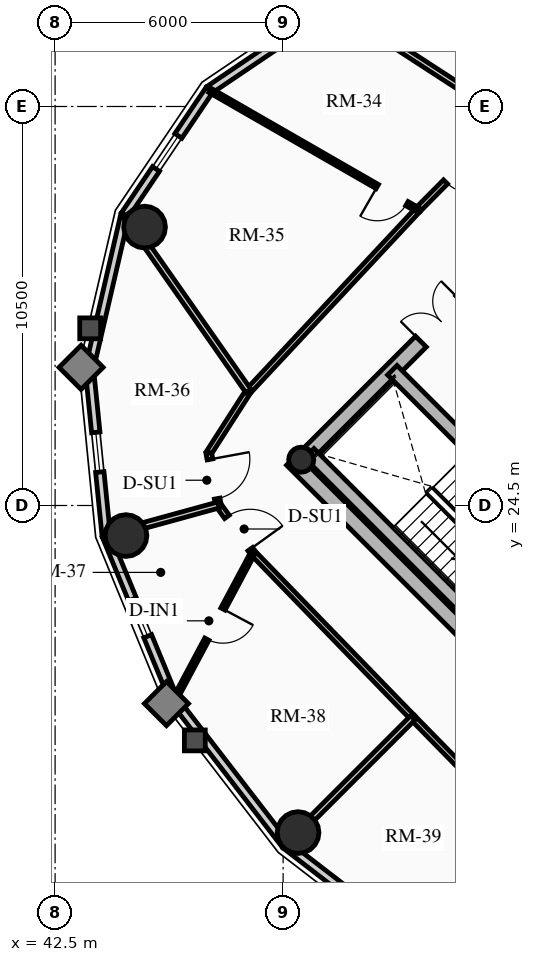
"""IFC4 building model, lengths in metres.
Left out: names, types, materials, properties, quantities, classifications, styles, units other than length and angle.
Written with IfcOpenShell. Run it as: python <this file> out.ifc"""

import sys

from ifc_helpers import new_model, si_unit, direction, frame, frame_2d, origin, origin_2d, place, context, subcontext, project, spatial, rectangle, circle, hollow_circle, extrude, source, transform, mapped, element, fill, save


model = new_model("IFC4")
c1 = context("Model", 3, precision=1e-05, world=origin(), true_north=direction((0.0, 1.0)))
c2 = subcontext(c1, "Body", "Model", "MODEL_VIEW")
j1 = project(units=[si_unit("LENGTHUNIT", "METRE"), si_unit("PLANEANGLEUNIT", "RADIAN")], contexts=[c1])
p1 = place(None, origin())
s1 = spatial("IfcSite", under=j1, at=p1, CompositionType="ELEMENT")
p2 = place(p1, origin())
s2 = spatial("IfcBuilding", under=s1, at=p2, CompositionType="ELEMENT")
p3 = place(p2, frame((0.0, 0.0, 208.3)))
s3 = spatial("IfcBuildingStorey", under=s2, at=p3, CompositionType="ELEMENT", Elevation=208.3)
p4 = place(p3, frame((58.702, 15.732, 0.0), z_axis=(0.0, 0.0, 1.0), x_axis=(-0.707106781187, 0.707106781187, 0.0)))
e1 = element("IfcWall", 1, at=p4, inside=s3, PredefinedType="SHEAR", context=c2, shape_type="SweptSolid", body=[
    extrude(rectangle(XDim=14.1, YDim=0.4, at=frame_2d((7.05, 0.0))), origin(), (0.0, 0.0, 1.0), 2.91),
])
p5 = place(p3, frame((48.873, 25.561, 0.0), z_axis=(0.0, 0.0, 1.0), x_axis=(0.707106781187, 0.707106781187, 0.0)))
e2 = element("IfcWall", 2, at=p5, inside=s3, PredefinedType="SHEAR", context=c2, shape_type="SweptSolid", body=[
    extrude(rectangle(XDim=10.7, YDim=0.4, at=frame_2d((5.35, 0.0))), origin(), (0.0, 0.0, 1.0), 2.91),
])
m1 = source(origin(), c2, "Body", "SweptSolid", [
    extrude(rectangle(XDim=1.5, YDim=2.02, at=frame_2d((0.75, 1.01))), frame((0.0, 0.21, 0.0), z_axis=(0.0, -1.0, 0.0), x_axis=(1.0, 0.0, 0.0)), (0.0, 0.0, 1.0), 0.42),
])
p6 = place(p5, frame((4.6, 0.0, 0.0)))
e3 = element("IfcOpeningElement", 3, at=p6, cuts=e2, PredefinedType="OPENING", context=c2, shape_type="MappedRepresentation", body=[
    mapped(m1, transform((0.0, 0.0, 0.0), x_axis=(1.0, 0.0, 0.0), y_axis=(0.0, 1.0, 0.0), z_axis=(0.0, 0.0, 1.0), scale=1.0)),
])
p7 = place(p3, frame((61.06, 18.373, 0.0), z_axis=(0.0, 0.0, 1.0), x_axis=(-0.707106781187, 0.707106781187, 0.0)))
e4 = element("IfcWall", 4, at=p7, inside=s3, PredefinedType="SHEAR", context=c2, shape_type="SweptSolid", body=[
    extrude(rectangle(XDim=13.7, YDim=0.35, at=frame_2d((6.85, 0.0))), origin(), (0.0, 0.0, 1.0), 2.91),
])
m2 = source(origin(), c2, "Body", "SweptSolid", [
    extrude(rectangle(XDim=1.1, YDim=2.015, at=frame_2d((0.55, 1.007))), frame((0.0, 0.185, 0.0), z_axis=(0.0, -1.0, 0.0), x_axis=(1.0, 0.0, 0.0)), (0.0, 0.0, 1.0), 0.37),
])
p8 = place(p7, frame((4.85, 0.0, 0.0)))
e5 = element("IfcOpeningElement", 5, at=p8, cuts=e4, PredefinedType="OPENING", context=c2, shape_type="MappedRepresentation", body=[
    mapped(m2, transform((0.0, 0.0, 0.0), x_axis=(1.0, 0.0, 0.0), y_axis=(0.0, 1.0, 0.0), z_axis=(0.0, 0.0, 1.0), scale=1.0)),
])
p9 = place(p7, frame((0.625, 0.0, 0.0)))
e6 = element("IfcOpeningElement", 6, at=p9, cuts=e4, PredefinedType="OPENING", context=c2, shape_type="MappedRepresentation", body=[
    mapped(m2, transform((0.0, 0.0, 0.0), x_axis=(1.0, 0.0, 0.0), y_axis=(0.0, 1.0, 0.0), z_axis=(0.0, 0.0, 1.0), scale=1.0)),
])
p10 = place(p7, frame((2.625, 0.0, 0.0)))
e7 = element("IfcOpeningElement", 7, at=p10, cuts=e4, PredefinedType="OPENING", context=c2, shape_type="MappedRepresentation", body=[
    mapped(m2, transform((0.0, 0.0, 0.0), x_axis=(1.0, 0.0, 0.0), y_axis=(0.0, 1.0, 0.0), z_axis=(0.0, 0.0, 1.0), scale=1.0)),
])
m3 = source(origin(), c2, "Body", "SweptSolid", [
    extrude(rectangle(XDim=1.15, YDim=2.02, at=frame_2d((0.575, 1.01))), frame((0.0, 0.185, 0.0), z_axis=(0.0, -1.0, 0.0), x_axis=(1.0, 0.0, 0.0)), (0.0, 0.0, 1.0), 0.37),
])
p11 = place(p7, frame((7.27, 0.0, 0.0)))
e8 = element("IfcOpeningElement", 8, at=p11, cuts=e4, PredefinedType="OPENING", context=c2, shape_type="MappedRepresentation", body=[
    mapped(m3, transform((0.0, 0.0, 0.0), x_axis=(1.0, 0.0, 0.0), y_axis=(0.0, 1.0, 0.0), z_axis=(0.0, 0.0, 1.0), scale=1.0)),
])
p12 = place(p3, frame((53.922, 21.141, 0.0), z_axis=(0.0, 0.0, 1.0), x_axis=(-0.707106781187, 0.707106781187, 0.0)))
e9 = element("IfcWall", 9, at=p12, inside=s3, PredefinedType="SHEAR", context=c2, shape_type="SweptSolid", body=[
    extrude(rectangle(XDim=6.695, YDim=0.35, at=frame_2d((3.348, 0.0))), origin(), (0.0, 0.0, 1.0), 2.91),
])
p13 = place(p3, frame((48.976, 25.706, 0.0), z_axis=(0.0, 0.0, 1.0), x_axis=(0.707106781187, 0.707106781187, 0.0)))
e10 = element("IfcColumn", 10, at=p13, inside=s3, PredefinedType="COLUMN", context=c2, shape_type="SweptSolid", body=[
    extrude(hollow_circle(Radius=0.33, WallThickness=0.025, at=origin_2d()), origin(), (0.0, 0.0, 1.0), 2.91),
])
for number, where, z_axis, x_axis in (
    (11, (44.854, 31.827, 0.0), (0.0, 0.0, 1.0), (1.0, 0.0, 0.0)),
    (12, (44.365, 23.709, 0.0), (0.0, 0.0, 1.0), (1.0, 0.0, 0.0)),
    (13, (48.893, 15.893, 0.0), (0.0, 0.0, 1.0), (1.0, 0.0, 0.0)),
):
    element("IfcColumn", number, at=place(p3, frame(where, z_axis=z_axis, x_axis=x_axis)), inside=s3, PredefinedType="USERDEFINED", context=c2, shape_type="SweptSolid", body=[
        extrude(circle(Radius=0.55, at=origin_2d()), origin(), (0.0, 0.0, 1.0), 2.91),
    ])
p14 = place(p3, frame((46.561, 35.439, 0.0), z_axis=(0.0, 0.0, 1.0), x_axis=(0.828833723692, 0.559495003079, 0.0)))
e14 = element("IfcWall", 14, at=p14, inside=s3, PredefinedType="SOLIDWALL", context=c2, shape_type="SweptSolid", body=[
    extrude(rectangle(XDim=3.976, YDim=0.22, at=frame_2d((1.988, 0.0))), origin(), (0.0, 0.0, 1.0), 2.322),
])
p15 = place(p3, frame((44.337, 32.144, 0.0), z_axis=(0.0, 0.0, 1.0), x_axis=(0.559495003079, 0.828833723692, 0.0)))
e15 = element("IfcWall", 15, at=p15, inside=s3, PredefinedType="SOLIDWALL", context=c2, shape_type="SweptSolid", body=[
    extrude(rectangle(XDim=3.976, YDim=0.22, at=frame_2d((1.988, 0.0))), origin(), (0.0, 0.0, 1.0), 2.322),
])
m4 = source(origin(), c2, "Body", "SweptSolid", [
    extrude(rectangle(XDim=1.05, YDim=1.3, at=frame_2d((0.525, 0.65))), frame((0.0, 0.12, 0.0), z_axis=(0.0, -1.0, 0.0), x_axis=(1.0, 0.0, 0.0)), (0.0, 0.0, 1.0), 0.24),
])
p16 = place(p15, frame((1.463, 0.0, 0.65)))
e16 = element("IfcOpeningElement", 16, at=p16, cuts=e15, PredefinedType="OPENING", context=c2, shape_type="MappedRepresentation", body=[
    mapped(m4, transform((0.0, 0.0, 0.0), x_axis=(1.0, 0.0, 0.0), y_axis=(0.0, 1.0, 0.0), z_axis=(0.0, 0.0, 1.0), scale=1.0)),
])
p17 = place(p3, frame((43.401, 28.1, 0.0), z_axis=(0.0, 0.0, 1.0), x_axis=(0.225473813158, 0.974249228678, 0.0)))
e17 = element("IfcWall", 17, at=p17, inside=s3, PredefinedType="SOLIDWALL", context=c2, shape_type="SweptSolid", body=[
    extrude(rectangle(XDim=4.15, YDim=0.22, at=frame_2d((2.075, 0.0))), origin(), (0.0, 0.0, 1.0), 2.322),
])
p18 = place(p3, frame((43.845, 23.705, 0.0), z_axis=(0.0, 0.0, 1.0), x_axis=(-0.100570534541, 0.994929930991, 0.0)))
e18 = element("IfcWall", 18, at=p18, inside=s3, PredefinedType="SOLIDWALL", context=c2, shape_type="SweptSolid", body=[
    extrude(rectangle(XDim=4.418, YDim=0.22, at=frame_2d((2.209, 0.0))), origin(), (0.0, 0.0, 1.0), 2.322),
])
p19 = place(p18, frame((1.684, 0.0, 0.65)))
e19 = element("IfcOpeningElement", 19, at=p19, cuts=e18, PredefinedType="OPENING", context=c2, shape_type="MappedRepresentation", body=[
    mapped(m4, transform((0.0, 0.0, 0.0), x_axis=(1.0, 0.0, 0.0), y_axis=(0.0, 1.0, 0.0), z_axis=(0.0, 0.0, 1.0), scale=1.0)),
])
p20 = place(p3, frame((45.626, 19.387, 0.0), z_axis=(0.0, 0.0, 1.0), x_axis=(-0.381309704956, 0.924447353237, 0.0)))
e20 = element("IfcWall", 20, at=p20, inside=s3, PredefinedType="SOLIDWALL", context=c2, shape_type="SweptSolid", body=[
    extrude(rectangle(XDim=4.671, YDim=0.22, at=frame_2d((2.335, 0.0))), origin(), (0.0, 0.0, 1.0), 2.322),
])
p21 = place(p20, frame((1.81, 0.0, 0.65)))
e21 = element("IfcOpeningElement", 21, at=p21, cuts=e20, PredefinedType="OPENING", context=c2, shape_type="MappedRepresentation", body=[
    mapped(m4, transform((0.0, 0.0, 0.0), x_axis=(1.0, 0.0, 0.0), y_axis=(0.0, 1.0, 0.0), z_axis=(0.0, 0.0, 1.0), scale=1.0)),
])
p22 = place(p3, frame((48.569, 15.569, 0.0), z_axis=(0.0, 0.0, 1.0), x_axis=(-0.610523083886, 0.791998462147, 0.0)))
e22 = element("IfcWall", 22, at=p22, inside=s3, PredefinedType="SOLIDWALL", context=c2, shape_type="SweptSolid", body=[
    extrude(rectangle(XDim=4.82, YDim=0.22, at=frame_2d((2.41, 0.0))), origin(), (0.0, 0.0, 1.0), 2.322),
])
p23 = place(p3, frame((52.387, 12.626, 0.0), z_axis=(0.0, 0.0, 1.0), x_axis=(-0.791998462147, 0.610523083886, 0.0)))
e23 = element("IfcWall", 23, at=p23, inside=s3, PredefinedType="SOLIDWALL", context=c2, shape_type="SweptSolid", body=[
    extrude(rectangle(XDim=4.82, YDim=0.22, at=frame_2d((2.41, 0.0))), origin(), (0.0, 0.0, 1.0), 2.322),
])
p24 = place(p23, frame((1.885, 0.0, 0.65)))
e24 = element("IfcOpeningElement", 24, at=p24, cuts=e23, PredefinedType="OPENING", context=c2, shape_type="MappedRepresentation", body=[
    mapped(m4, transform((0.0, 0.0, 0.0), x_axis=(1.0, 0.0, 0.0), y_axis=(0.0, 1.0, 0.0), z_axis=(0.0, 0.0, 1.0), scale=1.0)),
])
p25 = place(p3, frame((54.427, 34.683, 0.0), z_axis=(0.0, 0.0, 1.0), x_axis=(-0.704178989986, -0.710022499687, 0.0)))
e25 = element("IfcWall", 25, at=p25, inside=s3, PredefinedType="PARTITIONING", context=c2, shape_type="SweptSolid", body=[
    extrude(rectangle(XDim=3.384, YDim=0.15, at=frame_2d((1.692, 0.0))), origin(), (0.0, 0.0, 1.0), 2.322),
])
m5 = source(origin(), c2, "Body", "SweptSolid", [
    extrude(rectangle(XDim=1.05, YDim=2.015, at=frame_2d((0.525, 1.007))), frame((0.0, 0.085, 0.0), z_axis=(0.0, -1.0, 0.0), x_axis=(1.0, 0.0, 0.0)), (0.0, 0.0, 1.0), 0.17),
])
p26 = place(p25, frame((1.298, 0.0, 0.0)))
e26 = element("IfcOpeningElement", 26, at=p26, cuts=e25, PredefinedType="OPENING", context=c2, shape_type="MappedRepresentation", body=[
    mapped(m5, transform((0.0, 0.0, 0.0), x_axis=(1.0, 0.0, 0.0), y_axis=(0.0, 1.0, 0.0), z_axis=(0.0, 0.0, 1.0), scale=1.0)),
])
p27 = place(p3, frame((52.043, 32.28, 0.0), z_axis=(0.0, 0.0, 1.0), x_axis=(-0.682606081633, -0.730786519661, 0.0)))
e27 = element("IfcWall", 27, at=p27, inside=s3, PredefinedType="PARTITIONING", context=c2, shape_type="SweptSolid", body=[
    extrude(rectangle(XDim=6.527, YDim=0.15, at=frame_2d((3.263, 0.0))), origin(), (0.0, 0.0, 1.0), 2.255),
])
p28 = place(p3, frame((47.588, 27.51, 0.0), z_axis=(0.0, 0.0, 1.0), x_axis=(-0.540202619347, -0.841534984449, 0.0)))
e28 = element("IfcWall", 28, at=p28, inside=s3, PredefinedType="PARTITIONING", context=c2, shape_type="SweptSolid", body=[
    extrude(rectangle(XDim=1.935, YDim=0.15, at=frame_2d((0.967, 0.0))), origin(), (0.0, 0.0, 1.0), 2.255),
])
p29 = place(p3, frame((46.543, 25.882, 0.0), z_axis=(0.0, 0.0, 1.0), x_axis=(0.181153502579, -0.983454832976, 0.0)))
e29 = element("IfcWall", 29, at=p29, inside=s3, PredefinedType="PARTITIONING", context=c2, shape_type="SweptSolid", body=[
    extrude(rectangle(XDim=1.392, YDim=0.15, at=frame_2d((0.696, 0.0))), origin(), (0.0, 0.0, 1.0), 2.322),
])
p30 = place(p29, frame((0.171, 0.0, 0.0)))
e30 = element("IfcOpeningElement", 30, at=p30, cuts=e29, PredefinedType="OPENING", context=c2, shape_type="MappedRepresentation", body=[
    mapped(m5, transform((0.0, 0.0, 0.0), x_axis=(1.0, 0.0, 0.0), y_axis=(0.0, 1.0, 0.0), z_axis=(0.0, 0.0, 1.0), scale=1.0)),
])
p31 = place(p3, frame((46.795, 24.513, 0.0), z_axis=(0.0, 0.0, 1.0), x_axis=(0.585628197524, -0.810579801294, 0.0)))
e31 = element("IfcWall", 31, at=p31, inside=s3, PredefinedType="PARTITIONING", context=c2, shape_type="SweptSolid", body=[
    extrude(rectangle(XDim=1.554, YDim=0.15, at=frame_2d((0.777, 0.0))), origin(), (0.0, 0.0, 1.0), 2.255),
])
p32 = place(p31, frame((0.384, 0.0, 0.0)))
e32 = element("IfcOpeningElement", 32, at=p32, cuts=e31, PredefinedType="OPENING", context=c2, shape_type="MappedRepresentation", body=[
    mapped(m5, transform((0.0, 0.0, 0.0), x_axis=(1.0, 0.0, 0.0), y_axis=(0.0, 1.0, 0.0), z_axis=(0.0, 0.0, 1.0), scale=1.0)),
])
p33 = place(p3, frame((47.706, 23.253, 0.0), z_axis=(0.0, 0.0, 1.0), x_axis=(0.696179266346, -0.717867974707, 0.0)))
e33 = element("IfcWall", 33, at=p33, inside=s3, PredefinedType="PARTITIONING", context=c2, shape_type="SweptSolid", body=[
    extrude(rectangle(XDim=6.045, YDim=0.15, at=frame_2d((3.022, 0.0))), origin(), (0.0, 0.0, 1.0), 2.255),
])
p34 = place(p3, frame((51.914, 18.914, 0.0), z_axis=(0.0, 0.0, 1.0), x_axis=(0.699999313799, -0.714143515465, 0.0)))
e34 = element("IfcWall", 34, at=p34, inside=s3, PredefinedType="PARTITIONING", context=c2, shape_type="SweptSolid", body=[
    extrude(rectangle(XDim=6.162, YDim=0.15, at=frame_2d((3.081, 0.0))), origin(), (0.0, 0.0, 1.0), 2.255),
])
p35 = place(p3, frame((54.427, 34.683, 0.0), z_axis=(0.0, 0.0, 1.0), x_axis=(-0.83860663594, 0.544737469023, 0.0)))
e35 = element("IfcWall", 35, at=p35, inside=s3, PredefinedType="PARTITIONING", context=c2, shape_type="SweptSolid", body=[
    extrude(rectangle(XDim=5.439, YDim=0.16, at=frame_2d((2.72, 0.0))), origin(), (0.0, 0.0, 1.0), 2.322),
])
p36 = place(p3, frame((47.588, 27.51, 0.0), z_axis=(0.0, 0.0, 1.0), x_axis=(-0.573073195236, 0.819504187239, 0.0)))
e36 = element("IfcWall", 36, at=p36, inside=s3, PredefinedType="PARTITIONING", context=c2, shape_type="SweptSolid", body=[
    extrude(rectangle(XDim=5.643, YDim=0.16, at=frame_2d((2.822, 0.0))), origin(), (0.0, 0.0, 1.0), 2.322),
])
p37 = place(p3, frame((46.795, 24.513, 0.0), z_axis=(0.0, 0.0, 1.0), x_axis=(-0.964263392178, -0.264945485912, 0.0)))
e37 = element("IfcWall", 37, at=p37, inside=s3, PredefinedType="PARTITIONING", context=c2, shape_type="SweptSolid", body=[
    extrude(rectangle(XDim=3.039, YDim=0.16, at=frame_2d((1.52, 0.0))), origin(), (0.0, 0.0, 1.0), 2.322),
])
p38 = place(p3, frame((51.914, 18.914, 0.0), z_axis=(0.0, 0.0, 1.0), x_axis=(-0.707106781187, -0.707106781187, 0.0)))
e38 = element("IfcWall", 38, at=p38, inside=s3, PredefinedType="PARTITIONING", context=c2, shape_type="SweptSolid", body=[
    extrude(rectangle(XDim=4.71, YDim=0.16, at=frame_2d((2.355, 0.0))), origin(), (0.0, 0.0, 1.0), 2.322),
])
p39 = place(p3, frame((52.043, 32.28, 0.0), z_axis=(0.0, 0.0, 1.0), x_axis=(-0.866853616581, 0.498562741709, 0.0)))
e39 = element("IfcWall", 39, at=p39, inside=s3, PredefinedType="PARTITIONING", context=c2, shape_type="SweptSolid", body=[
    extrude(rectangle(XDim=6.308, YDim=0.125, at=frame_2d((3.154, 0.0))), origin(), (0.0, 0.0, 1.0), 2.322),
])
m6 = source(origin(), c2, "Body", "SweptSolid", [
    extrude(rectangle(XDim=0.9, YDim=2.005, at=frame_2d((0.45, 1.002))), frame((0.0, 0.073, 0.0), z_axis=(0.0, -1.0, 0.0), x_axis=(1.0, 0.0, 0.0)), (0.0, 0.0, 1.0), 0.145),
])
p40 = place(p39, frame((0.33, 0.0, 0.0)))
e40 = element("IfcOpeningElement", 40, at=p40, cuts=e39, PredefinedType="OPENING", context=c2, shape_type="MappedRepresentation", body=[
    mapped(m6, transform((0.0, 0.0, 0.0), x_axis=(1.0, 0.0, 0.0), y_axis=(0.0, 1.0, 0.0), z_axis=(0.0, 0.0, 1.0), scale=1.0)),
])
p41 = place(p3, frame((47.706, 23.253, 0.0), z_axis=(0.0, 0.0, 1.0), x_axis=(-0.471384756618, -0.881927667799, 0.0)))
e41 = element("IfcWall", 41, at=p41, inside=s3, PredefinedType="PARTITIONING", context=c2, shape_type="SweptSolid", body=[
    extrude(rectangle(XDim=4.374, YDim=0.125, at=frame_2d((2.187, 0.0))), origin(), (0.0, 0.0, 1.0), 2.255),
])
p42 = place(p41, frame((1.674, 0.0, 0.0)))
e42 = element("IfcOpeningElement", 42, at=p42, cuts=e41, PredefinedType="OPENING", context=c2, shape_type="MappedRepresentation", body=[
    mapped(m6, transform((0.0, 0.0, 0.0), x_axis=(1.0, 0.0, 0.0), y_axis=(0.0, 1.0, 0.0), z_axis=(0.0, 0.0, 1.0), scale=1.0)),
])
m7 = source(origin(), c2, "Body", "SweptSolid", [
    extrude(rectangle(XDim=1.05, YDim=1.3, at=frame_2d((0.525, 0.65))), frame((0.0, 0.03, 0.0), z_axis=(0.0, -1.0, 0.0), x_axis=(1.0, 0.0, 0.0)), (0.0, 0.0, 1.0), 0.06),
])
p43 = place(p16, origin())
e43 = element("IfcWindow", 43, at=p43, inside=s3, PartitioningType="SINGLE_PANEL", PredefinedType="WINDOW", context=c2, shape_type="MappedRepresentation", body=[
    mapped(m7, transform((0.0, 0.0, 0.0), x_axis=(1.0, 0.0, 0.0), y_axis=(0.0, 1.0, 0.0), z_axis=(0.0, 0.0, 1.0), scale=1.0)),
])
fill(e16, e43)
p44 = place(p19, origin())
e44 = element("IfcWindow", 44, at=p44, inside=s3, PartitioningType="SINGLE_PANEL", PredefinedType="WINDOW", context=c2, shape_type="MappedRepresentation", body=[
    mapped(m7, transform((0.0, 0.0, 0.0), x_axis=(1.0, 0.0, 0.0), y_axis=(0.0, 1.0, 0.0), z_axis=(0.0, 0.0, 1.0), scale=1.0)),
])
fill(e19, e44)
p45 = place(p21, origin())
e45 = element("IfcWindow", 45, at=p45, inside=s3, PartitioningType="SINGLE_PANEL", PredefinedType="WINDOW", context=c2, shape_type="MappedRepresentation", body=[
    mapped(m7, transform((0.0, 0.0, 0.0), x_axis=(1.0, 0.0, 0.0), y_axis=(0.0, 1.0, 0.0), z_axis=(0.0, 0.0, 1.0), scale=1.0)),
])
fill(e21, e45)
m8 = source(origin(), c2, "Body", "SweptSolid", [
    extrude(rectangle(XDim=1.5, YDim=2.02, at=frame_2d((0.75, 1.01))), frame((0.0, 0.025, 0.0), z_axis=(0.0, -1.0, 0.0), x_axis=(1.0, 0.0, 0.0)), (0.0, 0.0, 1.0), 0.05),
])
p46 = place(p6, origin())
e46 = element("IfcDoor", 46, at=p46, inside=s3, OperationType="DOUBLE_DOOR_SINGLE_SWING", PredefinedType="DOOR", context=c2, shape_type="MappedRepresentation", body=[
    mapped(m8, transform((0.0, 0.0, 0.0), x_axis=(1.0, 0.0, 0.0), y_axis=(0.0, 1.0, 0.0), z_axis=(0.0, 0.0, 1.0), scale=1.0)),
])
fill(e3, e46)
m9 = source(origin(), c2, "Body", "SweptSolid", [
    extrude(rectangle(XDim=1.05, YDim=2.015, at=frame_2d((0.525, 1.007))), frame((0.0, 0.025, 0.0), z_axis=(0.0, -1.0, 0.0), x_axis=(1.0, 0.0, 0.0)), (0.0, 0.0, 1.0), 0.05),
])
p47 = place(p26, origin())
e47 = element("IfcDoor", 47, at=p47, inside=s3, OperationType="SINGLE_SWING_LEFT", PredefinedType="DOOR", context=c2, shape_type="MappedRepresentation", body=[
    mapped(m9, transform((0.0, 0.0, 0.0), x_axis=(1.0, 0.0, 0.0), y_axis=(0.0, 1.0, 0.0), z_axis=(0.0, 0.0, 1.0), scale=1.0)),
])
fill(e26, e47)
m10 = source(origin(), c2, "Body", "SweptSolid", [
    extrude(rectangle(XDim=0.9, YDim=2.005, at=frame_2d((0.45, 1.002))), frame((0.0, 0.025, 0.0), z_axis=(0.0, -1.0, 0.0), x_axis=(1.0, 0.0, 0.0)), (0.0, 0.0, 1.0), 0.05),
])
p48 = place(p40, origin())
e48 = element("IfcDoor", 48, at=p48, inside=s3, OperationType="SINGLE_SWING_RIGHT", PredefinedType="DOOR", context=c2, shape_type="MappedRepresentation", body=[
    mapped(m10, transform((0.0, 0.0, 0.0), x_axis=(1.0, 0.0, 0.0), y_axis=(0.0, 1.0, 0.0), z_axis=(0.0, 0.0, 1.0), scale=1.0)),
])
fill(e40, e48)
p49 = place(p30, origin())
e49 = element("IfcDoor", 49, at=p49, inside=s3, OperationType="SINGLE_SWING_LEFT", PredefinedType="DOOR", context=c2, shape_type="MappedRepresentation", body=[
    mapped(m9, transform((0.0, 0.0, 0.0), x_axis=(1.0, 0.0, 0.0), y_axis=(0.0, 1.0, 0.0), z_axis=(0.0, 0.0, 1.0), scale=1.0)),
])
fill(e30, e49)
p50 = place(p32, origin())
e50 = element("IfcDoor", 50, at=p50, inside=s3, OperationType="SINGLE_SWING_RIGHT", PredefinedType="DOOR", context=c2, shape_type="MappedRepresentation", body=[
    mapped(m9, transform((0.0, 0.0, 0.0), x_axis=(1.0, 0.0, 0.0), y_axis=(0.0, 1.0, 0.0), z_axis=(0.0, 0.0, 1.0), scale=1.0)),
])
fill(e32, e50)
p51 = place(p42, origin())
e51 = element("IfcDoor", 51, at=p51, inside=s3, OperationType="SINGLE_SWING_LEFT", PredefinedType="DOOR", context=c2, shape_type="MappedRepresentation", body=[
    mapped(m10, transform((0.0, 0.0, 0.0), x_axis=(1.0, 0.0, 0.0), y_axis=(0.0, 1.0, 0.0), z_axis=(0.0, 0.0, 1.0), scale=1.0)),
])
fill(e42, e51)
save(model, sys.argv[1])
